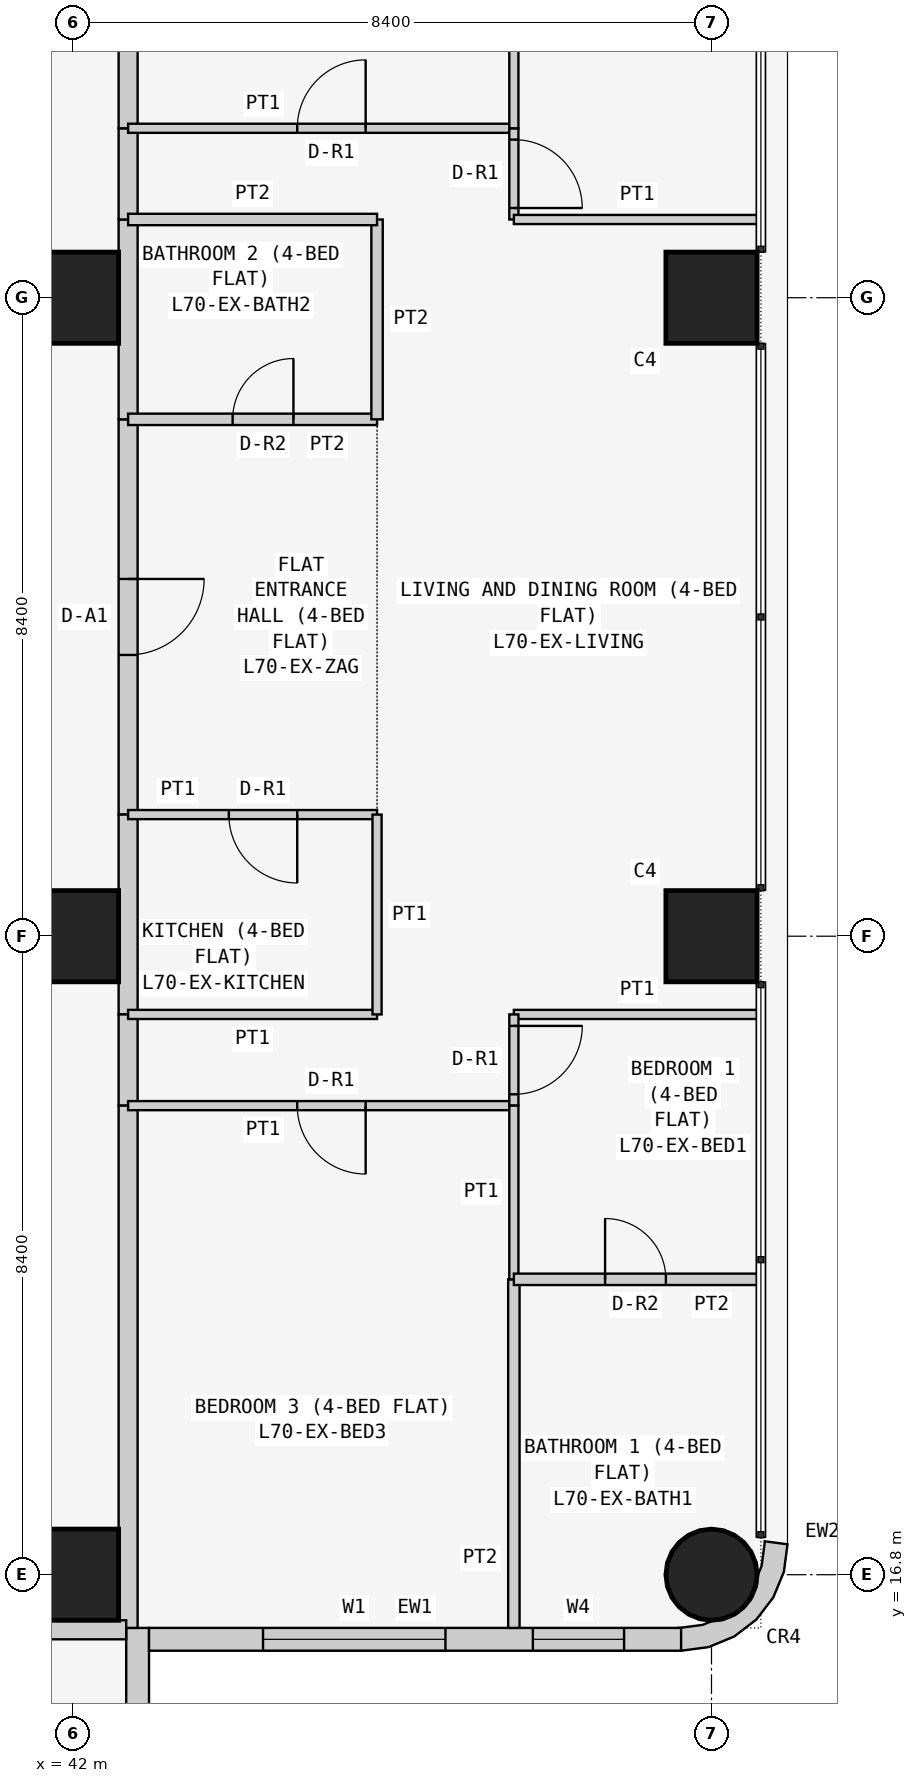
"""IFC4 building model, lengths in metres.
Left out: names, types, materials, properties, quantities, classifications, styles, units other than length and angle.
Written with IfcOpenShell. Run it as: python <this file> out.ifc"""

import sys

from ifc_helpers import new_model, si_unit, direction, frame, frame_2d, origin, origin_2d, place, context, subcontext, project, spatial, polyline, rectangle, circle, outline, extrude, element, fill, save


model = new_model("IFC4")
c1 = context("Model", 3, precision=1e-05, world=origin(), true_north=direction((0.0, 1.0)))
c2 = subcontext(c1, "Body", "Model", "MODEL_VIEW")
j1 = project(units=[si_unit("LENGTHUNIT", "METRE"), si_unit("PLANEANGLEUNIT", "RADIAN")], contexts=[c1])
p1 = place(None, origin())
s1 = spatial("IfcSite", under=j1, at=p1, CompositionType="ELEMENT")
p2 = place(p1, origin())
s2 = spatial("IfcBuilding", under=s1, at=p2, CompositionType="ELEMENT")
p3 = place(p2, frame((0.0, 0.0, 268.5)))
s3 = spatial("IfcBuildingStorey", under=s2, at=p3, CompositionType="ELEMENT", Elevation=268.5)
for number, where, z_axis, x_axis in (
    (1, (42.0, 16.8, 0.0), (0.0, 0.0, 1.0), (1.0, 0.0, 0.0)),
    (2, (42.0, 25.2, 0.0), (0.0, 0.0, 1.0), (1.0, 0.0, 0.0)),
    (3, (42.0, 33.6, 0.0), (0.0, 0.0, 1.0), (1.0, 0.0, 0.0)),
):
    element("IfcColumn", number, at=place(p3, frame(where, z_axis=z_axis, x_axis=x_axis)), inside=s3, PredefinedType="COLUMN", context=c2, shape_type="SweptSolid", body=[
        extrude(rectangle(XDim=1.2, YDim=1.2, at=origin_2d()), origin(), (0.0, 0.0, 1.0), 3.6),
    ])
p4 = place(p3, frame((50.4, 16.8, 0.0), z_axis=(0.0, 0.0, 1.0), x_axis=(1.0, 0.0, 0.0)))
e4 = element("IfcColumn", 4, at=p4, inside=s3, PredefinedType="COLUMN", context=c2, shape_type="SweptSolid", body=[
    extrude(circle(Radius=0.6, at=origin_2d()), origin(), (0.0, 0.0, 1.0), 3.6),
])
for number, where, z_axis, x_axis in (
    (5, (50.4, 25.2, 0.0), (0.0, 0.0, 1.0), (1.0, 0.0, 0.0)),
    (6, (50.4, 33.6, 0.0), (0.0, 0.0, 1.0), (1.0, 0.0, 0.0)),
):
    element("IfcColumn", number, at=place(p3, frame(where, z_axis=z_axis, x_axis=x_axis)), inside=s3, PredefinedType="COLUMN", context=c2, shape_type="SweptSolid", body=[
        extrude(rectangle(XDim=1.2, YDim=1.2, at=origin_2d()), origin(), (0.0, 0.0, 1.0), 3.6),
    ])
p5 = place(p3, frame((42.85, 8.8, 0.0), z_axis=(0.0, 0.0, 1.0), x_axis=(0.0, 1.0, 0.0)))
e7 = element("IfcWall", 7, at=p5, inside=s3, PredefinedType="SOLIDWALL", context=c2, shape_type="SweptSolid", body=[
    extrude(rectangle(XDim=7.3, YDim=0.3, at=frame_2d((3.65, 0.0))), origin(), (0.0, 0.0, 1.0), 3.45),
])
p6 = place(p5, frame((3.1, 0.0, 0.9)))
e8 = element("IfcOpeningElement", 8, at=p6, cuts=e7, PredefinedType="OPENING", context=c2, shape_type="SweptSolid", body=[
    extrude(rectangle(XDim=2.4, YDim=1.5, at=frame_2d((1.2, 0.75))), frame((0.0, 0.16, 0.0), z_axis=(0.0, -1.0, 0.0), x_axis=(1.0, 0.0, 0.0)), (0.0, 0.0, 1.0), 0.32),
])
p7 = place(p5, frame((0.75, 0.0, 0.9)))
e9 = element("IfcOpeningElement", 9, at=p7, cuts=e7, PredefinedType="OPENING", context=c2, shape_type="SweptSolid", body=[
    extrude(rectangle(XDim=1.2, YDim=1.5, at=frame_2d((0.6, 0.75))), frame((0.0, 0.16, 0.0), z_axis=(0.0, -1.0, 0.0), x_axis=(1.0, 0.0, 0.0)), (0.0, 0.0, 1.0), 0.32),
])
p8 = place(p3, frame((43.0, 15.95, 0.0), z_axis=(0.0, 0.0, 1.0), x_axis=(1.0, 0.0, 0.0)))
e10 = element("IfcWall", 10, at=p8, inside=s3, PredefinedType="SOLIDWALL", context=c2, shape_type="SweptSolid", body=[
    extrude(rectangle(XDim=7.0, YDim=0.3, at=frame_2d((3.5, 0.0))), origin(), (0.0, 0.0, 1.0), 3.45),
])
p9 = place(p8, frame((1.5, 0.0, 0.9)))
e11 = element("IfcOpeningElement", 11, at=p9, cuts=e10, PredefinedType="OPENING", context=c2, shape_type="SweptSolid", body=[
    extrude(rectangle(XDim=2.4, YDim=1.5, at=frame_2d((1.2, 0.75))), frame((0.0, 0.16, 0.0), z_axis=(0.0, -1.0, 0.0), x_axis=(1.0, 0.0, 0.0)), (0.0, 0.0, 1.0), 0.32),
])
p10 = place(p8, frame((5.05, 0.0, 0.9)))
e12 = element("IfcOpeningElement", 12, at=p10, cuts=e10, PredefinedType="OPENING", context=c2, shape_type="SweptSolid", body=[
    extrude(rectangle(XDim=1.2, YDim=1.5, at=frame_2d((0.6, 0.75))), frame((0.0, 0.16, 0.0), z_axis=(0.0, -1.0, 0.0), x_axis=(1.0, 0.0, 0.0)), (0.0, 0.0, 1.0), 0.32),
])
p11 = place(p3, frame((50.038, 16.224, 0.0), z_axis=(0.0, 0.0, 1.0), x_axis=(0.707106781187, -0.707106781187, 0.0)))
e13 = element("IfcWall", 13, at=p11, inside=s3, PredefinedType="SOLIDWALL", context=c2, shape_type="SweptSolid", body=[
    extrude(outline(polyline([(0.047, 1.455), (0.233, 1.212), (0.292, 1.069), (0.358, 1.003), (0.449, 0.782), (0.449, 0.543), (0.358, 0.322), (0.292, 0.257), (0.233, 0.114), (0.047, -0.129), (0.033, -0.143), (0.273, -0.327), (0.495, -0.037), (0.635, 0.301), (0.683, 0.663), (0.635, 1.025), (0.495, 1.363), (0.273, 1.653), (0.033, 1.469), (0.047, 1.455)])), origin(), (0.0, 0.0, 1.0), 3.45),
])
p12 = place(p3, frame((42.725, 32.0, 0.0), z_axis=(0.0, 0.0, 1.0), x_axis=(0.0, -1.0, 0.0)))
e14 = element("IfcWall", 14, at=p12, inside=s3, PredefinedType="PARTITIONING", context=c2, shape_type="SweptSolid", body=[
    extrude(rectangle(XDim=5.2, YDim=0.25, at=frame_2d((2.6, 0.0))), origin(), (0.0, 0.0, 1.0), 3.45),
])
p13 = place(p12, frame((2.1, 0.0, 0.0)))
e15 = element("IfcOpeningElement", 15, at=p13, cuts=e14, PredefinedType="OPENING", context=c2, shape_type="SweptSolid", body=[
    extrude(rectangle(XDim=1.0, YDim=2.1, at=frame_2d((0.5, 1.05))), frame((0.0, 0.135, 0.0), z_axis=(0.0, -1.0, 0.0), x_axis=(1.0, 0.0, 0.0)), (0.0, 0.0, 1.0), 0.27),
])
p14 = place(p3, frame((42.725, 34.629, 0.0), z_axis=(0.0, 0.0, 1.0), x_axis=(0.0, -1.0, 0.0)))
e16 = element("IfcWall", 16, at=p14, inside=s3, PredefinedType="PARTITIONING", context=c2, shape_type="SweptSolid", body=[
    extrude(rectangle(XDim=2.629, YDim=0.25, at=frame_2d((1.314, 0.0))), origin(), (0.0, 0.0, 1.0), 3.45),
])
p15 = place(p3, frame((42.725, 26.8, 0.0), z_axis=(0.0, 0.0, 1.0), x_axis=(0.0, -1.0, 0.0)))
e17 = element("IfcWall", 17, at=p15, inside=s3, PredefinedType="PARTITIONING", context=c2, shape_type="SweptSolid", body=[
    extrude(rectangle(XDim=2.629, YDim=0.25, at=frame_2d((1.314, 0.0))), origin(), (0.0, 0.0, 1.0), 3.45),
])
p16 = place(p3, frame((42.725, 24.171, 0.0), z_axis=(0.0, 0.0, 1.0), x_axis=(0.0, -1.0, 0.0)))
e18 = element("IfcWall", 18, at=p16, inside=s3, PredefinedType="PARTITIONING", context=c2, shape_type="SweptSolid", body=[
    extrude(rectangle(XDim=1.2, YDim=0.25, at=frame_2d((0.6, 0.0))), origin(), (0.0, 0.0, 1.0), 3.45),
])
p17 = place(p3, frame((42.725, 35.829, 0.0), z_axis=(0.0, 0.0, 1.0), x_axis=(0.0, -1.0, 0.0)))
e19 = element("IfcWall", 19, at=p17, inside=s3, PredefinedType="PARTITIONING", context=c2, shape_type="SweptSolid", body=[
    extrude(rectangle(XDim=1.2, YDim=0.25, at=frame_2d((0.6, 0.0))), origin(), (0.0, 0.0, 1.0), 3.45),
])
for number, where, z_axis, x_axis in (
    (20, (42.725, 42.7, 0.0), (0.0, 0.0, 1.0), (0.0, -1.0, 0.0)),
    (21, (42.725, 22.971, 0.0), (0.0, 0.0, 1.0), (0.0, -1.0, 0.0)),
    (22, (42.7, 16.075, 0.0), (0.0, 0.0, 1.0), (-1.0, 0.0, 0.0)),
):
    element("IfcWall", number, at=place(p3, frame(where, z_axis=z_axis, x_axis=x_axis)), inside=s3, PredefinedType="PARTITIONING", context=c2, shape_type="SweptSolid", body=[
        extrude(rectangle(XDim=6.871, YDim=0.25, at=frame_2d((3.436, 0.0))), origin(), (0.0, 0.0, 1.0), 3.45),
    ])
p18 = place(p3, frame((46.0, 32.0, 0.0), z_axis=(0.0, 0.0, 1.0), x_axis=(-1.0, 0.0, 0.0)))
e23 = element("IfcWall", 23, at=p18, inside=s3, PredefinedType="PARTITIONING", context=c2, shape_type="SweptSolid", body=[
    extrude(rectangle(XDim=3.275, YDim=0.15, at=frame_2d((1.637, 0.0))), origin(), (0.0, 0.0, 1.0), 3.45),
])
p19 = place(p18, frame((1.1, 0.0, 0.0)))
e24 = element("IfcOpeningElement", 24, at=p19, cuts=e23, PredefinedType="OPENING", context=c2, shape_type="SweptSolid", body=[
    extrude(rectangle(XDim=0.8, YDim=2.1, at=frame_2d((0.4, 1.05))), frame((0.0, 0.085, 0.0), z_axis=(0.0, -1.0, 0.0), x_axis=(1.0, 0.0, 0.0)), (0.0, 0.0, 1.0), 0.17),
])
p20 = place(p3, frame((42.725, 26.8, 0.0), z_axis=(0.0, 0.0, 1.0), x_axis=(1.0, 0.0, 0.0)))
e25 = element("IfcWall", 25, at=p20, inside=s3, PredefinedType="PARTITIONING", context=c2, shape_type="SweptSolid", body=[
    extrude(rectangle(XDim=3.275, YDim=0.12, at=frame_2d((1.637, 0.0))), origin(), (0.0, 0.0, 1.0), 3.45),
])
p21 = place(p20, frame((1.325, 0.0, 0.0)))
e26 = element("IfcOpeningElement", 26, at=p21, cuts=e25, PredefinedType="OPENING", context=c2, shape_type="SweptSolid", body=[
    extrude(rectangle(XDim=0.9, YDim=2.1, at=frame_2d((0.45, 1.05))), frame((0.0, 0.07, 0.0), z_axis=(0.0, -1.0, 0.0), x_axis=(1.0, 0.0, 0.0)), (0.0, 0.0, 1.0), 0.14),
])
p22 = place(p3, frame((46.0, 32.0, 0.0), z_axis=(0.0, 0.0, 1.0), x_axis=(0.0, 1.0, 0.0)))
e27 = element("IfcWall", 27, at=p22, inside=s3, PredefinedType="PARTITIONING", context=c2, shape_type="SweptSolid", body=[
    extrude(rectangle(XDim=2.629, YDim=0.15, at=frame_2d((1.314, 0.0))), origin(), (0.0, 0.0, 1.0), 3.45),
])
p23 = place(p3, frame((46.0, 34.629, 0.0), z_axis=(0.0, 0.0, 1.0), x_axis=(-1.0, 0.0, 0.0)))
e28 = element("IfcWall", 28, at=p23, inside=s3, PredefinedType="PARTITIONING", context=c2, shape_type="SweptSolid", body=[
    extrude(rectangle(XDim=3.275, YDim=0.15, at=frame_2d((1.637, 0.0))), origin(), (0.0, 0.0, 1.0), 3.45),
])
p24 = place(p3, frame((42.725, 24.171, 0.0), z_axis=(0.0, 0.0, 1.0), x_axis=(1.0, 0.0, 0.0)))
e29 = element("IfcWall", 29, at=p24, inside=s3, PredefinedType="PARTITIONING", context=c2, shape_type="SweptSolid", body=[
    extrude(rectangle(XDim=3.275, YDim=0.12, at=frame_2d((1.637, 0.0))), origin(), (0.0, 0.0, 1.0), 3.45),
])
p25 = place(p3, frame((46.0, 24.171, 0.0), z_axis=(0.0, 0.0, 1.0), x_axis=(0.0, 1.0, 0.0)))
e30 = element("IfcWall", 30, at=p25, inside=s3, PredefinedType="PARTITIONING", context=c2, shape_type="SweptSolid", body=[
    extrude(rectangle(XDim=2.629, YDim=0.12, at=frame_2d((1.314, 0.0))), origin(), (0.0, 0.0, 1.0), 3.45),
])
p26 = place(p3, frame((42.725, 35.829, 0.0), z_axis=(0.0, 0.0, 1.0), x_axis=(1.0, 0.0, 0.0)))
e31 = element("IfcWall", 31, at=p26, inside=s3, PredefinedType="PARTITIONING", context=c2, shape_type="SweptSolid", body=[
    extrude(rectangle(XDim=5.075, YDim=0.12, at=frame_2d((2.538, 0.0))), origin(), (0.0, 0.0, 1.0), 3.45),
])
p27 = place(p26, frame((2.225, 0.0, 0.0)))
e32 = element("IfcOpeningElement", 32, at=p27, cuts=e31, PredefinedType="OPENING", context=c2, shape_type="SweptSolid", body=[
    extrude(rectangle(XDim=0.9, YDim=2.1, at=frame_2d((0.45, 1.05))), frame((0.0, 0.07, 0.0), z_axis=(0.0, -1.0, 0.0), x_axis=(1.0, 0.0, 0.0)), (0.0, 0.0, 1.0), 0.14),
])
p28 = place(p3, frame((47.8, 35.829, 0.0), z_axis=(0.0, 0.0, 1.0), x_axis=(0.0, -1.0, 0.0)))
e33 = element("IfcWall", 33, at=p28, inside=s3, PredefinedType="PARTITIONING", context=c2, shape_type="SweptSolid", body=[
    extrude(rectangle(XDim=1.2, YDim=0.12, at=frame_2d((0.6, 0.0))), origin(), (0.0, 0.0, 1.0), 3.45),
])
p29 = place(p28, frame((0.149, 0.0, 0.0)))
e34 = element("IfcOpeningElement", 34, at=p29, cuts=e33, PredefinedType="OPENING", context=c2, shape_type="SweptSolid", body=[
    extrude(rectangle(XDim=0.9, YDim=2.1, at=frame_2d((0.45, 1.05))), frame((0.0, 0.07, 0.0), z_axis=(0.0, -1.0, 0.0), x_axis=(1.0, 0.0, 0.0)), (0.0, 0.0, 1.0), 0.14),
])
p30 = place(p3, frame((47.8, 34.629, 0.0), z_axis=(0.0, 0.0, 1.0), x_axis=(1.0, 0.0, 0.0)))
e35 = element("IfcWall", 35, at=p30, inside=s3, PredefinedType="PARTITIONING", context=c2, shape_type="SweptSolid", body=[
    extrude(rectangle(XDim=3.25, YDim=0.12, at=frame_2d((1.625, 0.0))), origin(), (0.0, 0.0, 1.0), 3.45),
])
p31 = place(p3, frame((47.8, 22.971, 0.0), z_axis=(0.0, 0.0, 1.0), x_axis=(-1.0, 0.0, 0.0)))
e36 = element("IfcWall", 36, at=p31, inside=s3, PredefinedType="PARTITIONING", context=c2, shape_type="SweptSolid", body=[
    extrude(rectangle(XDim=5.075, YDim=0.12, at=frame_2d((2.538, 0.0))), origin(), (0.0, 0.0, 1.0), 3.45),
])
p32 = place(p31, frame((1.95, 0.0, 0.0)))
e37 = element("IfcOpeningElement", 37, at=p32, cuts=e36, PredefinedType="OPENING", context=c2, shape_type="SweptSolid", body=[
    extrude(rectangle(XDim=0.9, YDim=2.1, at=frame_2d((0.45, 1.05))), frame((0.0, 0.07, 0.0), z_axis=(0.0, -1.0, 0.0), x_axis=(1.0, 0.0, 0.0)), (0.0, 0.0, 1.0), 0.14),
])
p33 = place(p3, frame((51.05, 24.171, 0.0), z_axis=(0.0, 0.0, 1.0), x_axis=(-1.0, 0.0, 0.0)))
e38 = element("IfcWall", 38, at=p33, inside=s3, PredefinedType="PARTITIONING", context=c2, shape_type="SweptSolid", body=[
    extrude(rectangle(XDim=3.25, YDim=0.12, at=frame_2d((1.625, 0.0))), origin(), (0.0, 0.0, 1.0), 3.45),
])
p34 = place(p3, frame((47.8, 24.171, 0.0), z_axis=(0.0, 0.0, 1.0), x_axis=(0.0, -1.0, 0.0)))
e39 = element("IfcWall", 39, at=p34, inside=s3, PredefinedType="PARTITIONING", context=c2, shape_type="SweptSolid", body=[
    extrude(rectangle(XDim=1.2, YDim=0.12, at=frame_2d((0.6, 0.0))), origin(), (0.0, 0.0, 1.0), 3.45),
])
p35 = place(p34, frame((0.151, 0.0, 0.0)))
e40 = element("IfcOpeningElement", 40, at=p35, cuts=e39, PredefinedType="OPENING", context=c2, shape_type="SweptSolid", body=[
    extrude(rectangle(XDim=0.9, YDim=2.1, at=frame_2d((0.45, 1.05))), frame((0.0, 0.07, 0.0), z_axis=(0.0, -1.0, 0.0), x_axis=(1.0, 0.0, 0.0)), (0.0, 0.0, 1.0), 0.14),
])
p36 = place(p3, frame((47.8, 35.829, 0.0), z_axis=(0.0, 0.0, 1.0), x_axis=(0.0, 1.0, 0.0)))
e41 = element("IfcWall", 41, at=p36, inside=s3, PredefinedType="PARTITIONING", context=c2, shape_type="SweptSolid", body=[
    extrude(rectangle(XDim=6.871, YDim=0.12, at=frame_2d((3.436, 0.0))), origin(), (0.0, 0.0, 1.0), 3.45),
])
p37 = place(p3, frame((47.8, 16.1, 0.0), z_axis=(0.0, 0.0, 1.0), x_axis=(0.0, 1.0, 0.0)))
e42 = element("IfcWall", 42, at=p37, inside=s3, PredefinedType="PARTITIONING", context=c2, shape_type="SweptSolid", body=[
    extrude(rectangle(XDim=4.586, YDim=0.15, at=frame_2d((2.293, 0.0))), origin(), (0.0, 0.0, 1.0), 3.45),
])
p38 = place(p3, frame((47.8, 20.686, 0.0), z_axis=(0.0, 0.0, 1.0), x_axis=(0.0, 1.0, 0.0)))
e43 = element("IfcWall", 43, at=p38, inside=s3, PredefinedType="PARTITIONING", context=c2, shape_type="SweptSolid", body=[
    extrude(rectangle(XDim=2.285, YDim=0.12, at=frame_2d((1.143, 0.0))), origin(), (0.0, 0.0, 1.0), 3.45),
])
p39 = place(p3, frame((51.05, 20.686, 0.0), z_axis=(0.0, 0.0, 1.0), x_axis=(-1.0, 0.0, 0.0)))
e44 = element("IfcWall", 44, at=p39, inside=s3, PredefinedType="PARTITIONING", context=c2, shape_type="SweptSolid", body=[
    extrude(rectangle(XDim=3.25, YDim=0.15, at=frame_2d((1.625, 0.0))), origin(), (0.0, 0.0, 1.0), 3.45),
])
p40 = place(p39, frame((1.25, 0.0, 0.0)))
e45 = element("IfcOpeningElement", 45, at=p40, cuts=e44, PredefinedType="OPENING", context=c2, shape_type="SweptSolid", body=[
    extrude(rectangle(XDim=0.8, YDim=2.1, at=frame_2d((0.4, 1.05))), frame((0.0, 0.085, 0.0), z_axis=(0.0, -1.0, 0.0), x_axis=(1.0, 0.0, 0.0)), (0.0, 0.0, 1.0), 0.17),
])
p41 = place(p9, origin())
e46 = element("IfcWindow", 46, at=p41, inside=s3, PartitioningType="SINGLE_PANEL", PredefinedType="WINDOW", context=c2, shape_type="SweptSolid", body=[
    extrude(rectangle(XDim=2.4, YDim=1.5, at=frame_2d((1.2, 0.75))), frame((0.0, 0.03, 0.0), z_axis=(0.0, -1.0, 0.0), x_axis=(1.0, 0.0, 0.0)), (0.0, 0.0, 1.0), 0.06),
])
fill(e11, e46)
p42 = place(p10, origin())
e47 = element("IfcWindow", 47, at=p42, inside=s3, PartitioningType="SINGLE_PANEL", PredefinedType="WINDOW", context=c2, shape_type="SweptSolid", body=[
    extrude(rectangle(XDim=1.2, YDim=1.5, at=frame_2d((0.6, 0.75))), frame((0.0, 0.03, 0.0), z_axis=(0.0, -1.0, 0.0), x_axis=(1.0, 0.0, 0.0)), (0.0, 0.0, 1.0), 0.06),
])
fill(e12, e47)
p43 = place(p13, origin())
e48 = element("IfcDoor", 48, at=p43, inside=s3, OperationType="SINGLE_SWING_LEFT", PredefinedType="DOOR", context=c2, shape_type="SweptSolid", body=[
    extrude(rectangle(XDim=1.0, YDim=2.1, at=frame_2d((0.5, 1.05))), frame((0.0, 0.025, 0.0), z_axis=(0.0, -1.0, 0.0), x_axis=(1.0, 0.0, 0.0)), (0.0, 0.0, 1.0), 0.05),
])
fill(e15, e48)
p44 = place(p19, frame((0.8, 0.0, 0.0), z_axis=(0.0, 0.0, 1.0), x_axis=(-1.0, 0.0, 0.0)))
e49 = element("IfcDoor", 49, at=p44, inside=s3, OperationType="SINGLE_SWING_RIGHT", PredefinedType="DOOR", context=c2, shape_type="SweptSolid", body=[
    extrude(rectangle(XDim=0.8, YDim=2.1, at=frame_2d((0.4, 1.05))), frame((0.0, 0.025, 0.0), z_axis=(0.0, -1.0, 0.0), x_axis=(1.0, 0.0, 0.0)), (0.0, 0.0, 1.0), 0.05),
])
fill(e24, e49)
p45 = place(p21, frame((0.9, 0.0, 0.0), z_axis=(0.0, 0.0, 1.0), x_axis=(-1.0, 0.0, 0.0)))
e50 = element("IfcDoor", 50, at=p45, inside=s3, OperationType="SINGLE_SWING_LEFT", PredefinedType="DOOR", context=c2, shape_type="SweptSolid", body=[
    extrude(rectangle(XDim=0.9, YDim=2.1, at=frame_2d((0.45, 1.05))), frame((0.0, 0.025, 0.0), z_axis=(0.0, -1.0, 0.0), x_axis=(1.0, 0.0, 0.0)), (0.0, 0.0, 1.0), 0.05),
])
fill(e26, e50)
p46 = place(p27, origin())
e51 = element("IfcDoor", 51, at=p46, inside=s3, OperationType="SINGLE_SWING_RIGHT", PredefinedType="DOOR", context=c2, shape_type="SweptSolid", body=[
    extrude(rectangle(XDim=0.9, YDim=2.1, at=frame_2d((0.45, 1.05))), frame((0.0, 0.025, 0.0), z_axis=(0.0, -1.0, 0.0), x_axis=(1.0, 0.0, 0.0)), (0.0, 0.0, 1.0), 0.05),
])
fill(e32, e51)
p47 = place(p29, origin())
e52 = element("IfcDoor", 52, at=p47, inside=s3, OperationType="SINGLE_SWING_RIGHT", PredefinedType="DOOR", context=c2, shape_type="SweptSolid", body=[
    extrude(rectangle(XDim=0.9, YDim=2.1, at=frame_2d((0.45, 1.05))), frame((0.0, 0.025, 0.0), z_axis=(0.0, -1.0, 0.0), x_axis=(1.0, 0.0, 0.0)), (0.0, 0.0, 1.0), 0.05),
])
fill(e34, e52)
p48 = place(p32, origin())
e53 = element("IfcDoor", 53, at=p48, inside=s3, OperationType="SINGLE_SWING_LEFT", PredefinedType="DOOR", context=c2, shape_type="SweptSolid", body=[
    extrude(rectangle(XDim=0.9, YDim=2.1, at=frame_2d((0.45, 1.05))), frame((0.0, 0.025, 0.0), z_axis=(0.0, -1.0, 0.0), x_axis=(1.0, 0.0, 0.0)), (0.0, 0.0, 1.0), 0.05),
])
fill(e37, e53)
p49 = place(p35, origin())
e54 = element("IfcDoor", 54, at=p49, inside=s3, OperationType="SINGLE_SWING_LEFT", PredefinedType="DOOR", context=c2, shape_type="SweptSolid", body=[
    extrude(rectangle(XDim=0.9, YDim=2.1, at=frame_2d((0.45, 1.05))), frame((0.0, 0.025, 0.0), z_axis=(0.0, -1.0, 0.0), x_axis=(1.0, 0.0, 0.0)), (0.0, 0.0, 1.0), 0.05),
])
fill(e40, e54)
p50 = place(p40, frame((0.8, 0.0, 0.0), z_axis=(0.0, 0.0, 1.0), x_axis=(-1.0, 0.0, 0.0)))
e55 = element("IfcDoor", 55, at=p50, inside=s3, OperationType="SINGLE_SWING_LEFT", PredefinedType="DOOR", context=c2, shape_type="SweptSolid", body=[
    extrude(rectangle(XDim=0.8, YDim=2.1, at=frame_2d((0.4, 1.05))), frame((0.0, 0.025, 0.0), z_axis=(0.0, -1.0, 0.0), x_axis=(1.0, 0.0, 0.0)), (0.0, 0.0, 1.0), 0.05),
])
fill(e45, e55)
save(model, sys.argv[1])
